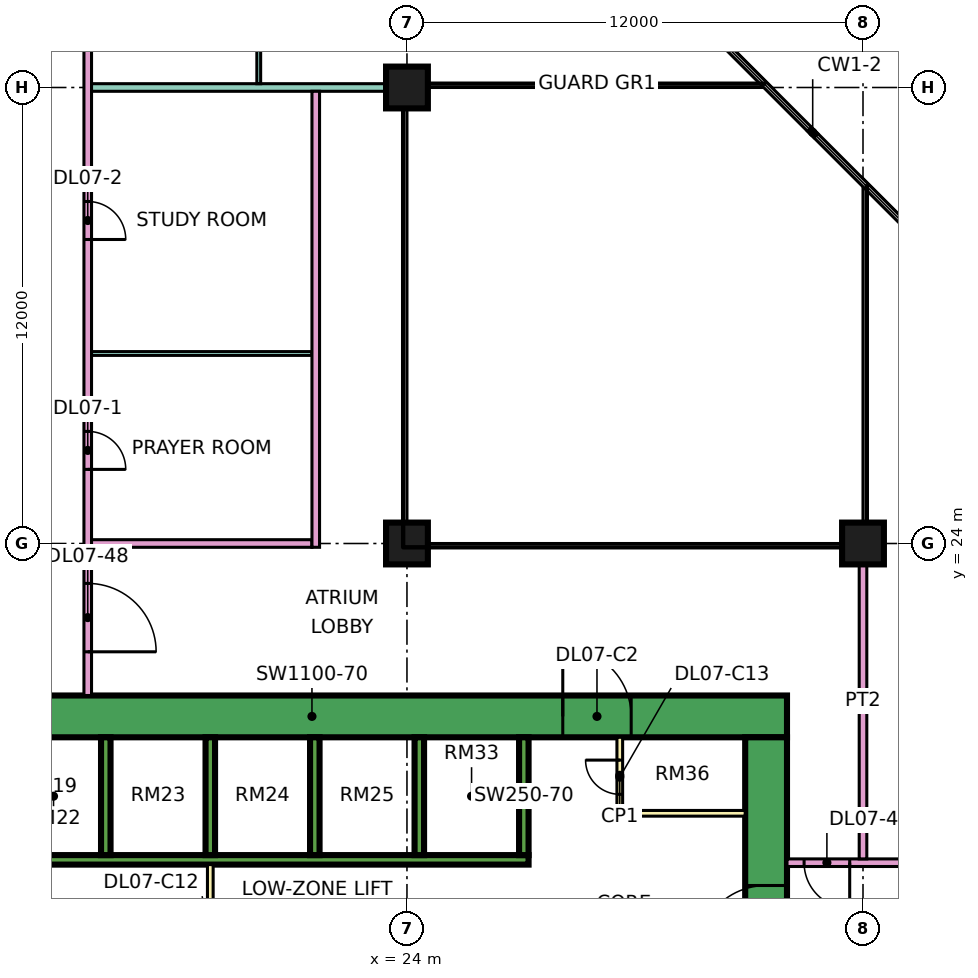
"""IFC4 building model, lengths in metres.
Left out: names, types, materials, properties, quantities, classifications, styles, units other than length and angle.
Written with IfcOpenShell. Run it as: python <this file> out.ifc"""

import sys

from ifc_helpers import new_model, si_unit, direction, frame, frame_2d, origin, origin_2d, place, context, subcontext, project, spatial, rectangle, extrude, element, fill, save


model = new_model("IFC4")
c1 = context("Model", 3, precision=1e-05, world=origin(), true_north=direction((0.0, 1.0)))
c2 = subcontext(c1, "Body", "Model", "MODEL_VIEW")
j1 = project(units=[si_unit("LENGTHUNIT", "METRE"), si_unit("PLANEANGLEUNIT", "RADIAN")], contexts=[c1])
p1 = place(None, origin())
s1 = spatial("IfcSite", under=j1, at=p1, CompositionType="ELEMENT")
p2 = place(p1, origin())
s2 = spatial("IfcBuilding", under=s1, at=p2, CompositionType="ELEMENT")
p3 = place(p2, frame((0.0, 0.0, 41.4)))
s3 = spatial("IfcBuildingStorey", under=s2, at=p3, CompositionType="ELEMENT", Elevation=41.4)
for number, where, z_axis, x_axis in (
    (1, (24.0, 24.0, 0.0), (0.0, 0.0, 1.0), (1.0, 0.0, 0.0)),
    (2, (24.0, 36.0, 0.0), (0.0, 0.0, 1.0), (1.0, 0.0, 0.0)),
    (3, (36.0, 24.0, 0.0), (0.0, 0.0, 1.0), (1.0, 0.0, 0.0)),
):
    element("IfcColumn", number, at=place(p3, frame(where, z_axis=z_axis, x_axis=x_axis)), inside=s3, PredefinedType="COLUMN", context=c2, shape_type="SweptSolid", body=[
        extrude(rectangle(XDim=1.1, YDim=1.1, at=origin_2d()), origin(), (0.0, 0.0, 1.0), 3.75),
    ])
p4 = place(p3, frame((9.0, 19.45, 0.0), z_axis=(0.0, 0.0, 1.0), x_axis=(1.0, 0.0, 0.0)))
e4 = element("IfcWall", 4, at=p4, inside=s3, PredefinedType="SHEAR", context=c2, shape_type="SweptSolid", body=[
    extrude(rectangle(XDim=25.0, YDim=1.1, at=frame_2d((12.5, 0.0))), origin(), (0.0, 0.0, 1.0), 3.75),
])
p5 = place(p4, frame((19.1, 0.0, 0.0)))
e5 = element("IfcOpeningElement", 5, at=p5, cuts=e4, PredefinedType="OPENING", context=c2, shape_type="SweptSolid", body=[
    extrude(rectangle(XDim=1.8, YDim=2.4, at=frame_2d((0.9, 1.2))), frame((0.0, 0.56, 0.0), z_axis=(0.0, -1.0, 0.0), x_axis=(1.0, 0.0, 0.0)), (0.0, 0.0, 1.0), 1.12),
])
p6 = place(p3, frame((33.45, 8.1, 0.0), z_axis=(0.0, 0.0, 1.0), x_axis=(0.0, 1.0, 0.0)))
e6 = element("IfcWall", 6, at=p6, inside=s3, PredefinedType="SHEAR", context=c2, shape_type="SweptSolid", body=[
    extrude(rectangle(XDim=10.8, YDim=1.1, at=frame_2d((5.4, 0.0))), origin(), (0.0, 0.0, 1.0), 3.75),
])
p7 = place(p6, frame((5.1, 0.0, 0.0)))
e7 = element("IfcOpeningElement", 7, at=p7, cuts=e6, PredefinedType="OPENING", context=c2, shape_type="SweptSolid", body=[
    extrude(rectangle(XDim=1.8, YDim=2.4, at=frame_2d((0.9, 1.2))), frame((0.0, 0.56, 0.0), z_axis=(0.0, -1.0, 0.0), x_axis=(1.0, 0.0, 0.0)), (0.0, 0.0, 1.0), 1.12),
])
p8 = place(p3, frame((13.45, 15.675, 0.0), z_axis=(0.0, 0.0, 1.0), x_axis=(1.0, 0.0, 0.0)))
e8 = element("IfcWall", 8, at=p8, inside=s3, PredefinedType="SHEAR", context=c2, shape_type="SweptSolid", body=[
    extrude(rectangle(XDim=13.75, YDim=0.25, at=frame_2d((6.875, 0.0))), origin(), (0.0, 0.0, 1.0), 3.75),
])
for number, where, z_axis, x_axis in (
    (9, (16.075, 15.8, 0.0), (0.0, 0.0, 1.0), (0.0, 1.0, 0.0)),
    (10, (18.825, 15.8, 0.0), (0.0, 0.0, 1.0), (0.0, 1.0, 0.0)),
    (11, (21.575, 15.8, 0.0), (0.0, 0.0, 1.0), (0.0, 1.0, 0.0)),
    (12, (24.325, 15.8, 0.0), (0.0, 0.0, 1.0), (0.0, 1.0, 0.0)),
    (13, (27.075, 15.8, 0.0), (0.0, 0.0, 1.0), (0.0, 1.0, 0.0)),
):
    element("IfcWall", number, at=place(p3, frame(where, z_axis=z_axis, x_axis=x_axis)), inside=s3, PredefinedType="SHEAR", context=c2, shape_type="SweptSolid", body=[
        extrude(rectangle(XDim=3.1, YDim=0.25, at=frame_2d((1.55, 0.0))), origin(), (0.0, 0.0, 1.0), 3.75),
    ])
p9 = place(p3, frame((18.825, 11.45, 0.0), z_axis=(0.0, 0.0, 1.0), x_axis=(0.0, 1.0, 0.0)))
e14 = element("IfcWall", 14, at=p9, inside=s3, PredefinedType="PARTITIONING", context=c2, shape_type="SweptSolid", body=[
    extrude(rectangle(XDim=4.1, YDim=0.15, at=frame_2d((2.05, 0.0))), origin(), (0.0, 0.0, 1.0), 3.35),
])
p10 = place(p9, frame((1.15, 0.0, 0.0)))
e15 = element("IfcOpeningElement", 15, at=p10, cuts=e14, PredefinedType="OPENING", context=c2, shape_type="SweptSolid", body=[
    extrude(rectangle(XDim=1.8, YDim=2.4, at=frame_2d((0.9, 1.2))), frame((0.0, 0.085, 0.0), z_axis=(0.0, -1.0, 0.0), x_axis=(1.0, 0.0, 0.0)), (0.0, 0.0, 1.0), 0.17),
])
p11 = place(p3, frame((29.6, 16.9, 0.0), z_axis=(0.0, 0.0, 1.0), x_axis=(0.0, 1.0, 0.0)))
e16 = element("IfcWall", 16, at=p11, inside=s3, PredefinedType="PARTITIONING", context=c2, shape_type="SweptSolid", body=[
    extrude(rectangle(XDim=2.0, YDim=0.15, at=frame_2d((1.0, 0.0))), origin(), (0.0, 0.0, 1.0), 3.35),
])
p12 = place(p11, frame((0.5, 0.0, 0.0)))
e17 = element("IfcOpeningElement", 17, at=p12, cuts=e16, PredefinedType="OPENING", context=c2, shape_type="SweptSolid", body=[
    extrude(rectangle(XDim=0.9, YDim=2.1, at=frame_2d((0.45, 1.05))), frame((0.0, 0.085, 0.0), z_axis=(0.0, -1.0, 0.0), x_axis=(1.0, 0.0, 0.0)), (0.0, 0.0, 1.0), 0.17),
])
p13 = place(p3, frame((29.6, 16.9, 0.0), z_axis=(0.0, 0.0, 1.0), x_axis=(1.0, 0.0, 0.0)))
e18 = element("IfcWall", 18, at=p13, inside=s3, PredefinedType="PARTITIONING", context=c2, shape_type="SweptSolid", body=[
    extrude(rectangle(XDim=3.3, YDim=0.15, at=frame_2d((1.65, 0.0))), origin(), (0.0, 0.0, 1.0), 3.35),
])
p14 = place(p3, frame((15.6, 20.0, 0.0), z_axis=(0.0, 0.0, 1.0), x_axis=(0.0, 1.0, 0.0)))
e19 = element("IfcWall", 19, at=p14, inside=s3, PredefinedType="PARTITIONING", context=c2, shape_type="SweptSolid", body=[
    extrude(rectangle(XDim=27.775, YDim=0.2, at=frame_2d((13.887, 0.0))), origin(), (0.0, 0.0, 1.0), 3.35),
])
p15 = place(p14, frame((5.95, 0.0, 0.0)))
e20 = element("IfcOpeningElement", 20, at=p15, cuts=e19, PredefinedType="OPENING", context=c2, shape_type="SweptSolid", body=[
    extrude(rectangle(XDim=1.0, YDim=2.1, at=frame_2d((0.5, 1.05))), frame((0.0, 0.11, 0.0), z_axis=(0.0, -1.0, 0.0), x_axis=(1.0, 0.0, 0.0)), (0.0, 0.0, 1.0), 0.22),
])
p16 = place(p14, frame((12.0, 0.0, 0.0)))
e21 = element("IfcOpeningElement", 21, at=p16, cuts=e19, PredefinedType="OPENING", context=c2, shape_type="SweptSolid", body=[
    extrude(rectangle(XDim=1.0, YDim=2.1, at=frame_2d((0.5, 1.05))), frame((0.0, 0.11, 0.0), z_axis=(0.0, -1.0, 0.0), x_axis=(1.0, 0.0, 0.0)), (0.0, 0.0, 1.0), 0.22),
])
p17 = place(p14, frame((17.05, 0.0, 0.0)))
e22 = element("IfcOpeningElement", 22, at=p17, cuts=e19, PredefinedType="OPENING", context=c2, shape_type="SweptSolid", body=[
    extrude(rectangle(XDim=1.0, YDim=2.1, at=frame_2d((0.5, 1.05))), frame((0.0, 0.11, 0.0), z_axis=(0.0, -1.0, 0.0), x_axis=(1.0, 0.0, 0.0)), (0.0, 0.0, 1.0), 0.22),
])
p18 = place(p14, frame((1.15, 0.0, 0.0)))
e23 = element("IfcOpeningElement", 23, at=p18, cuts=e19, PredefinedType="OPENING", context=c2, shape_type="SweptSolid", body=[
    extrude(rectangle(XDim=1.8, YDim=2.1, at=frame_2d((0.9, 1.05))), frame((0.0, 0.11, 0.0), z_axis=(0.0, -1.0, 0.0), x_axis=(1.0, 0.0, 0.0)), (0.0, 0.0, 1.0), 0.22),
])
p19 = place(p14, frame((25.9, 0.0, 0.0)))
e24 = element("IfcOpeningElement", 24, at=p19, cuts=e19, PredefinedType="OPENING", context=c2, shape_type="SweptSolid", body=[
    extrude(rectangle(XDim=1.0, YDim=2.1, at=frame_2d((0.5, 1.05))), frame((0.0, 0.11, 0.0), z_axis=(0.0, -1.0, 0.0), x_axis=(1.0, 0.0, 0.0)), (0.0, 0.0, 1.0), 0.22),
])
p20 = place(p3, frame((15.7, 24.0, 0.0), z_axis=(0.0, 0.0, 1.0), x_axis=(1.0, 0.0, 0.0)))
e25 = element("IfcWall", 25, at=p20, inside=s3, PredefinedType="PARTITIONING", context=c2, shape_type="SweptSolid", body=[
    extrude(rectangle(XDim=5.8, YDim=0.2, at=frame_2d((2.9, 0.0))), origin(), (0.0, 0.0, 1.0), 3.35),
])
p21 = place(p3, frame((15.7, 29.0, 0.0), z_axis=(0.0, 0.0, 1.0), x_axis=(1.0, 0.0, 0.0)))
e26 = element("IfcWall", 26, at=p21, inside=s3, PredefinedType="PARTITIONING", context=c2, shape_type="SweptSolid", body=[
    extrude(rectangle(XDim=5.8, YDim=0.1, at=frame_2d((2.9, 0.0))), origin(), (0.0, 0.0, 1.0), 3.35),
])
p22 = place(p3, frame((15.7, 36.0, 0.0), z_axis=(0.0, 0.0, 1.0), x_axis=(1.0, 0.0, 0.0)))
e27 = element("IfcWall", 27, at=p22, inside=s3, PredefinedType="PARTITIONING", context=c2, shape_type="SweptSolid", body=[
    extrude(rectangle(XDim=8.3, YDim=0.2, at=frame_2d((4.15, 0.0))), origin(), (0.0, 0.0, 1.0), 3.35),
])
p23 = place(p3, frame((20.1, 36.1, 0.0), z_axis=(0.0, 0.0, 1.0), x_axis=(0.0, 1.0, 0.0)))
e28 = element("IfcWall", 28, at=p23, inside=s3, PredefinedType="PARTITIONING", context=c2, shape_type="SweptSolid", body=[
    extrude(rectangle(XDim=2.85, YDim=0.1, at=frame_2d((1.425, 0.0))), origin(), (0.0, 0.0, 1.0), 3.35),
])
p24 = place(p23, frame((0.95, 0.0, 0.0)))
e29 = element("IfcOpeningElement", 29, at=p24, cuts=e28, PredefinedType="OPENING", context=c2, shape_type="SweptSolid", body=[
    extrude(rectangle(XDim=0.9, YDim=2.1, at=frame_2d((0.45, 1.05))), frame((0.0, 0.06, 0.0), z_axis=(0.0, -1.0, 0.0), x_axis=(1.0, 0.0, 0.0)), (0.0, 0.0, 1.0), 0.12),
])
p25 = place(p3, frame((21.6, 23.9, 0.0), z_axis=(0.0, 0.0, 1.0), x_axis=(0.0, 1.0, 0.0)))
e30 = element("IfcWall", 30, at=p25, inside=s3, PredefinedType="PARTITIONING", context=c2, shape_type="SweptSolid", body=[
    extrude(rectangle(XDim=12.0, YDim=0.2, at=frame_2d((6.0, 0.0))), origin(), (0.0, 0.0, 1.0), 3.35),
])
p26 = place(p3, frame((34.0, 15.6, 0.0), z_axis=(0.0, 0.0, 1.0), x_axis=(1.0, 0.0, 0.0)))
e31 = element("IfcWall", 31, at=p26, inside=s3, PredefinedType="PARTITIONING", context=c2, shape_type="SweptSolid", body=[
    extrude(rectangle(XDim=10.35, YDim=0.2, at=frame_2d((5.175, 0.0))), origin(), (0.0, 0.0, 1.0), 3.35),
])
p27 = place(p26, frame((5.6, 0.0, 0.0)))
e32 = element("IfcOpeningElement", 32, at=p27, cuts=e31, PredefinedType="OPENING", context=c2, shape_type="SweptSolid", body=[
    extrude(rectangle(XDim=1.0, YDim=2.1, at=frame_2d((0.5, 1.05))), frame((0.0, 0.11, 0.0), z_axis=(0.0, -1.0, 0.0), x_axis=(1.0, 0.0, 0.0)), (0.0, 0.0, 1.0), 0.22),
])
p28 = place(p26, frame((0.45, 0.0, 0.0)))
e33 = element("IfcOpeningElement", 33, at=p28, cuts=e31, PredefinedType="OPENING", context=c2, shape_type="SweptSolid", body=[
    extrude(rectangle(XDim=1.2, YDim=2.1, at=frame_2d((0.6, 1.05))), frame((0.0, 0.11, 0.0), z_axis=(0.0, -1.0, 0.0), x_axis=(1.0, 0.0, 0.0)), (0.0, 0.0, 1.0), 0.22),
])
p29 = place(p3, frame((36.0, 15.7, 0.0), z_axis=(0.0, 0.0, 1.0), x_axis=(0.0, 1.0, 0.0)))
e34 = element("IfcWall", 34, at=p29, inside=s3, PredefinedType="PARTITIONING", context=c2, shape_type="SweptSolid", body=[
    extrude(rectangle(XDim=8.3, YDim=0.2, at=frame_2d((4.15, 0.0))), origin(), (0.0, 0.0, 1.0), 3.35),
])
p30 = place(p7, origin())
e35 = element("IfcDoor", 35, at=p30, inside=s3, OperationType="DOUBLE_DOOR_SINGLE_SWING", PredefinedType="DOOR", context=c2, shape_type="SweptSolid", body=[
    extrude(rectangle(XDim=1.8, YDim=2.4, at=frame_2d((0.9, 1.2))), frame((0.0, 0.025, 0.0), z_axis=(0.0, -1.0, 0.0), x_axis=(1.0, 0.0, 0.0)), (0.0, 0.0, 1.0), 0.05),
])
fill(e7, e35)
p31 = place(p5, origin())
e36 = element("IfcDoor", 36, at=p31, inside=s3, OperationType="DOUBLE_DOOR_SINGLE_SWING", PredefinedType="DOOR", context=c2, shape_type="SweptSolid", body=[
    extrude(rectangle(XDim=1.8, YDim=2.4, at=frame_2d((0.9, 1.2))), frame((0.0, 0.025, 0.0), z_axis=(0.0, -1.0, 0.0), x_axis=(1.0, 0.0, 0.0)), (0.0, 0.0, 1.0), 0.05),
])
fill(e5, e36)
p32 = place(p12, frame((0.9, 0.0, 0.0), z_axis=(0.0, 0.0, 1.0), x_axis=(-1.0, 0.0, 0.0)))
e37 = element("IfcDoor", 37, at=p32, inside=s3, OperationType="SINGLE_SWING_RIGHT", PredefinedType="DOOR", context=c2, shape_type="SweptSolid", body=[
    extrude(rectangle(XDim=0.9, YDim=2.1, at=frame_2d((0.45, 1.05))), frame((0.0, 0.025, 0.0), z_axis=(0.0, -1.0, 0.0), x_axis=(1.0, 0.0, 0.0)), (0.0, 0.0, 1.0), 0.05),
])
fill(e17, e37)
p33 = place(p15, frame((1.0, 0.0, 0.0), z_axis=(0.0, 0.0, 1.0), x_axis=(-1.0, 0.0, 0.0)))
e38 = element("IfcDoor", 38, at=p33, inside=s3, OperationType="SINGLE_SWING_LEFT", PredefinedType="DOOR", context=c2, shape_type="SweptSolid", body=[
    extrude(rectangle(XDim=1.0, YDim=2.1, at=frame_2d((0.5, 1.05))), frame((0.0, 0.025, 0.0), z_axis=(0.0, -1.0, 0.0), x_axis=(1.0, 0.0, 0.0)), (0.0, 0.0, 1.0), 0.05),
])
fill(e20, e38)
p34 = place(p16, frame((1.0, 0.0, 0.0), z_axis=(0.0, 0.0, 1.0), x_axis=(-1.0, 0.0, 0.0)))
e39 = element("IfcDoor", 39, at=p34, inside=s3, OperationType="SINGLE_SWING_LEFT", PredefinedType="DOOR", context=c2, shape_type="SweptSolid", body=[
    extrude(rectangle(XDim=1.0, YDim=2.1, at=frame_2d((0.5, 1.05))), frame((0.0, 0.025, 0.0), z_axis=(0.0, -1.0, 0.0), x_axis=(1.0, 0.0, 0.0)), (0.0, 0.0, 1.0), 0.05),
])
fill(e21, e39)
p35 = place(p28, origin())
e40 = element("IfcDoor", 40, at=p35, inside=s3, OperationType="SINGLE_SWING_RIGHT", PredefinedType="DOOR", context=c2, shape_type="SweptSolid", body=[
    extrude(rectangle(XDim=1.2, YDim=2.1, at=frame_2d((0.6, 1.05))), frame((0.0, 0.025, 0.0), z_axis=(0.0, -1.0, 0.0), x_axis=(1.0, 0.0, 0.0)), (0.0, 0.0, 1.0), 0.05),
])
fill(e33, e40)
p36 = place(p18, frame((1.8, 0.0, 0.0), z_axis=(0.0, 0.0, 1.0), x_axis=(-1.0, 0.0, 0.0)))
e41 = element("IfcDoor", 41, at=p36, inside=s3, OperationType="DOUBLE_DOOR_SINGLE_SWING", PredefinedType="DOOR", context=c2, shape_type="SweptSolid", body=[
    extrude(rectangle(XDim=1.8, YDim=2.1, at=frame_2d((0.9, 1.05))), frame((0.0, 0.025, 0.0), z_axis=(0.0, -1.0, 0.0), x_axis=(1.0, 0.0, 0.0)), (0.0, 0.0, 1.0), 0.05),
])
fill(e23, e41)
save(model, sys.argv[1])
